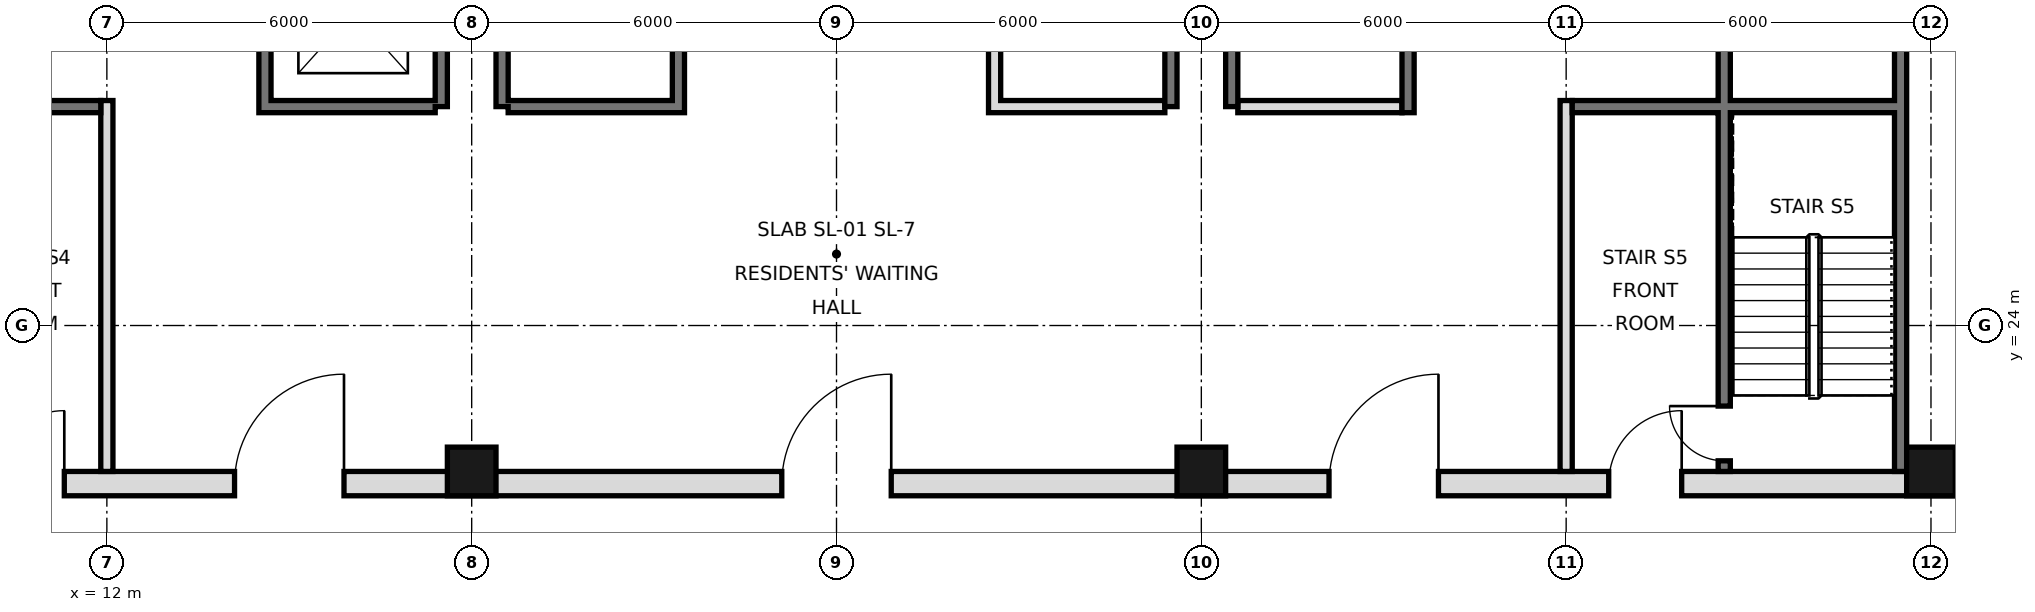
"""IFC4 building model, lengths in metres.
Left out: names, types, materials, properties, quantities, classifications, styles, units other than length and angle.
Written with IfcOpenShell. Run it as: python <this file> out.ifc"""

import sys

from ifc_helpers import new_model, si_unit, direction, frame, frame_2d, origin, origin_2d, place, context, subcontext, project, spatial, rectangle, hollow_rectangle, extrude, element, fill, save


model = new_model("IFC4")
c1 = context("Model", 3, precision=1e-05, world=origin(), true_north=direction((0.0, 1.0)))
c2 = subcontext(c1, "Body", "Model", "MODEL_VIEW")
j1 = project(units=[si_unit("LENGTHUNIT", "METRE"), si_unit("PLANEANGLEUNIT", "RADIAN")], contexts=[c1])
p1 = place(None, origin())
s1 = spatial("IfcSite", under=j1, at=p1, CompositionType="ELEMENT")
p2 = place(p1, origin())
s2 = spatial("IfcBuilding", under=s1, at=p2, CompositionType="ELEMENT")
p3 = place(p2, frame((0.0, 0.0, 78.6)))
s3 = spatial("IfcBuildingStorey", under=s2, at=p3, CompositionType="ELEMENT", Elevation=78.6)
for number, where, z_axis, x_axis in (
    (1, (18.0, 21.6, 0.0), (0.0, 0.0, 1.0), (1.0, 0.0, 0.0)),
    (2, (30.0, 21.6, 0.0), (0.0, 0.0, 1.0), (1.0, 0.0, 0.0)),
    (3, (42.0, 21.6, 0.0), (0.0, 0.0, 1.0), (1.0, 0.0, 0.0)),
):
    element("IfcColumn", number, at=place(p3, frame(where, z_axis=z_axis, x_axis=x_axis)), inside=s3, PredefinedType="COLUMN", context=c2, shape_type="SweptSolid", body=[
        extrude(hollow_rectangle(XDim=0.8, YDim=0.8, WallThickness=0.06, at=origin_2d()), origin(), (0.0, 0.0, 1.0), 3.6),
    ])
p4 = place(p3, frame((41.5, 21.6, 0.0), z_axis=(0.0, 0.0, 1.0), x_axis=(0.0, 1.0, 0.0)))
e4 = element("IfcWall", 4, at=p4, inside=s3, PredefinedType="SOLIDWALL", context=c2, shape_type="SweptSolid", body=[
    extrude(rectangle(XDim=23.5, YDim=0.2, at=frame_2d((11.75, 0.0))), origin(), (0.0, 0.0, 1.0), 3.42),
])
for number, where, z_axis, x_axis in (
    (5, (17.5, 27.6, 0.0), (0.0, 0.0, 1.0), (0.0, 1.0, 0.0)),
    (6, (18.5, 27.6, 0.0), (0.0, 0.0, 1.0), (0.0, 1.0, 0.0)),
    (7, (29.5, 27.6, 0.0), (0.0, 0.0, 1.0), (0.0, 1.0, 0.0)),
    (8, (30.5, 27.6, 0.0), (0.0, 0.0, 1.0), (0.0, 1.0, 0.0)),
):
    element("IfcWall", number, at=place(p3, frame(where, z_axis=z_axis, x_axis=x_axis)), inside=s3, PredefinedType="SOLIDWALL", context=c2, shape_type="SweptSolid", body=[
        extrude(rectangle(XDim=17.5, YDim=0.2, at=frame_2d((8.75, 0.0))), origin(), (0.0, 0.0, 1.0), 3.42),
    ])
p5 = place(p3, frame((5.6, 21.4, 0.0), z_axis=(0.0, 0.0, 1.0), x_axis=(1.0, 0.0, 0.0)))
e9 = element("IfcWall", 9, at=p5, inside=s3, PredefinedType="SOLIDWALL", context=c2, shape_type="SweptSolid", body=[
    extrude(rectangle(XDim=36.8, YDim=0.4, at=frame_2d((18.4, 0.0))), origin(), (0.0, 0.0, 1.0), 3.42),
])
p6 = place(p5, frame((8.5, 0.0, 0.0)))
e10 = element("IfcOpeningElement", 10, at=p6, cuts=e9, PredefinedType="OPENING", context=c2, shape_type="SweptSolid", body=[
    extrude(rectangle(XDim=1.8, YDim=2.1, at=frame_2d((0.9, 1.05))), frame((0.0, 0.21, 0.0), z_axis=(0.0, -1.0, 0.0), x_axis=(1.0, 0.0, 0.0)), (0.0, 0.0, 1.0), 0.42),
])
p7 = place(p5, frame((17.5, 0.0, 0.0)))
e11 = element("IfcOpeningElement", 11, at=p7, cuts=e9, PredefinedType="OPENING", context=c2, shape_type="SweptSolid", body=[
    extrude(rectangle(XDim=1.8, YDim=2.1, at=frame_2d((0.9, 1.05))), frame((0.0, 0.21, 0.0), z_axis=(0.0, -1.0, 0.0), x_axis=(1.0, 0.0, 0.0)), (0.0, 0.0, 1.0), 0.42),
])
p8 = place(p5, frame((26.5, 0.0, 0.0)))
e12 = element("IfcOpeningElement", 12, at=p8, cuts=e9, PredefinedType="OPENING", context=c2, shape_type="SweptSolid", body=[
    extrude(rectangle(XDim=1.8, YDim=2.1, at=frame_2d((0.9, 1.05))), frame((0.0, 0.21, 0.0), z_axis=(0.0, -1.0, 0.0), x_axis=(1.0, 0.0, 0.0)), (0.0, 0.0, 1.0), 0.42),
])
p9 = place(p5, frame((4.5, 0.0, 0.0)))
e13 = element("IfcOpeningElement", 13, at=p9, cuts=e9, PredefinedType="OPENING", context=c2, shape_type="SweptSolid", body=[
    extrude(rectangle(XDim=1.2, YDim=2.1, at=frame_2d((0.6, 1.05))), frame((0.0, 0.21, 0.0), z_axis=(0.0, -1.0, 0.0), x_axis=(1.0, 0.0, 0.0)), (0.0, 0.0, 1.0), 0.42),
])
p10 = place(p5, frame((31.1, 0.0, 0.0)))
e14 = element("IfcOpeningElement", 14, at=p10, cuts=e9, PredefinedType="OPENING", context=c2, shape_type="SweptSolid", body=[
    extrude(rectangle(XDim=1.2, YDim=2.1, at=frame_2d((0.6, 1.05))), frame((0.0, 0.21, 0.0), z_axis=(0.0, -1.0, 0.0), x_axis=(1.0, 0.0, 0.0)), (0.0, 0.0, 1.0), 0.42),
])
p11 = place(p3, frame((12.0, 21.6, 0.0), z_axis=(0.0, 0.0, 1.0), x_axis=(0.0, 1.0, 0.0)))
e15 = element("IfcWall", 15, at=p11, inside=s3, PredefinedType="PARTITIONING", context=c2, shape_type="SweptSolid", body=[
    extrude(rectangle(XDim=6.1, YDim=0.2, at=frame_2d((3.05, 0.0))), origin(), (0.0, 0.0, 1.0), 3.42),
])
p12 = place(p3, frame((14.6, 27.5, 0.0), z_axis=(0.0, 0.0, 1.0), x_axis=(0.0, 1.0, 0.0)))
e16 = element("IfcWall", 16, at=p12, inside=s3, PredefinedType="SOLIDWALL", context=c2, shape_type="SweptSolid", body=[
    extrude(rectangle(XDim=17.5, YDim=0.2, at=frame_2d((8.75, 0.0))), origin(), (0.0, 0.0, 1.0), 3.42),
])
p13 = place(p12, frame((1.1, 0.0, 0.0)))
e17 = element("IfcOpeningElement", 17, at=p13, cuts=e16, PredefinedType="OPENING", context=c2, shape_type="SweptSolid", body=[
    extrude(rectangle(XDim=1.1, YDim=2.1, at=frame_2d((0.55, 1.05))), frame((0.0, 0.11, 0.0), z_axis=(0.0, -1.0, 0.0), x_axis=(1.0, 0.0, 0.0)), (0.0, 0.0, 1.0), 0.22),
])
p14 = place(p12, frame((4.2, 0.0, 0.0)))
e18 = element("IfcOpeningElement", 18, at=p14, cuts=e16, PredefinedType="OPENING", context=c2, shape_type="SweptSolid", body=[
    extrude(rectangle(XDim=1.1, YDim=2.1, at=frame_2d((0.55, 1.05))), frame((0.0, 0.11, 0.0), z_axis=(0.0, -1.0, 0.0), x_axis=(1.0, 0.0, 0.0)), (0.0, 0.0, 1.0), 0.22),
])
p15 = place(p12, frame((15.4, 0.0, 0.0)))
e19 = element("IfcOpeningElement", 19, at=p15, cuts=e16, PredefinedType="OPENING", context=c2, shape_type="SweptSolid", body=[
    extrude(rectangle(XDim=1.1, YDim=2.1, at=frame_2d((0.55, 1.05))), frame((0.0, 0.11, 0.0), z_axis=(0.0, -1.0, 0.0), x_axis=(1.0, 0.0, 0.0)), (0.0, 0.0, 1.0), 0.22),
])
p16 = place(p12, frame((9.9, 0.0, 0.0)))
e20 = element("IfcOpeningElement", 20, at=p16, cuts=e16, PredefinedType="OPENING", context=c2, shape_type="SweptSolid", body=[
    extrude(rectangle(XDim=0.9, YDim=2.1, at=frame_2d((0.45, 1.05))), frame((0.0, 0.11, 0.0), z_axis=(0.0, -1.0, 0.0), x_axis=(1.0, 0.0, 0.0)), (0.0, 0.0, 1.0), 0.22),
])
p17 = place(p3, frame((21.4, 27.5, 0.0), z_axis=(0.0, 0.0, 1.0), x_axis=(0.0, 1.0, 0.0)))
e21 = element("IfcWall", 21, at=p17, inside=s3, PredefinedType="SOLIDWALL", context=c2, shape_type="SweptSolid", body=[
    extrude(rectangle(XDim=17.5, YDim=0.2, at=frame_2d((8.75, 0.0))), origin(), (0.0, 0.0, 1.0), 3.42),
])
p18 = place(p17, frame((9.8, 0.0, 0.0)))
e22 = element("IfcOpeningElement", 22, at=p18, cuts=e21, PredefinedType="OPENING", context=c2, shape_type="SweptSolid", body=[
    extrude(rectangle(XDim=1.0, YDim=2.1, at=frame_2d((0.5, 1.05))), frame((0.0, 0.11, 0.0), z_axis=(0.0, -1.0, 0.0), x_axis=(1.0, 0.0, 0.0)), (0.0, 0.0, 1.0), 0.22),
])
p19 = place(p17, frame((7.4, 0.0, 0.0)))
e23 = element("IfcOpeningElement", 23, at=p19, cuts=e21, PredefinedType="OPENING", context=c2, shape_type="SweptSolid", body=[
    extrude(rectangle(XDim=0.9, YDim=2.1, at=frame_2d((0.45, 1.05))), frame((0.0, 0.11, 0.0), z_axis=(0.0, -1.0, 0.0), x_axis=(1.0, 0.0, 0.0)), (0.0, 0.0, 1.0), 0.22),
])
p20 = place(p3, frame((26.6, 27.5, 0.0), z_axis=(0.0, 0.0, 1.0), x_axis=(0.0, 1.0, 0.0)))
e24 = element("IfcWall", 24, at=p20, inside=s3, PredefinedType="SOLIDWALL", context=c2, shape_type="SweptSolid", body=[
    extrude(rectangle(XDim=17.5, YDim=0.2, at=frame_2d((8.75, 0.0))), origin(), (0.0, 0.0, 1.0), 3.42),
])
p21 = place(p20, frame((4.3, 0.0, 0.0)))
e25 = element("IfcOpeningElement", 25, at=p21, cuts=e24, PredefinedType="OPENING", context=c2, shape_type="SweptSolid", body=[
    extrude(rectangle(XDim=0.9, YDim=2.1, at=frame_2d((0.45, 1.05))), frame((0.0, 0.11, 0.0), z_axis=(0.0, -1.0, 0.0), x_axis=(1.0, 0.0, 0.0)), (0.0, 0.0, 1.0), 0.22),
])
p22 = place(p20, frame((10.35, 0.0, 0.0)))
e26 = element("IfcOpeningElement", 26, at=p22, cuts=e24, PredefinedType="OPENING", context=c2, shape_type="SweptSolid", body=[
    extrude(rectangle(XDim=1.0, YDim=2.1, at=frame_2d((0.5, 1.05))), frame((0.0, 0.11, 0.0), z_axis=(0.0, -1.0, 0.0), x_axis=(1.0, 0.0, 0.0)), (0.0, 0.0, 1.0), 0.22),
])
p23 = place(p20, frame((14.575, 0.0, 0.0)))
e27 = element("IfcOpeningElement", 27, at=p23, cuts=e24, PredefinedType="OPENING", context=c2, shape_type="SweptSolid", body=[
    extrude(rectangle(XDim=1.0, YDim=2.1, at=frame_2d((0.5, 1.05))), frame((0.0, 0.11, 0.0), z_axis=(0.0, -1.0, 0.0), x_axis=(1.0, 0.0, 0.0)), (0.0, 0.0, 1.0), 0.22),
])
p24 = place(p3, frame((33.4, 27.5, 0.0), z_axis=(0.0, 0.0, 1.0), x_axis=(0.0, 1.0, 0.0)))
e28 = element("IfcWall", 28, at=p24, inside=s3, PredefinedType="SOLIDWALL", context=c2, shape_type="SweptSolid", body=[
    extrude(rectangle(XDim=17.5, YDim=0.2, at=frame_2d((8.75, 0.0))), origin(), (0.0, 0.0, 1.0), 3.42),
])
p25 = place(p24, frame((15.4, 0.0, 0.0)))
e29 = element("IfcOpeningElement", 29, at=p25, cuts=e28, PredefinedType="OPENING", context=c2, shape_type="SweptSolid", body=[
    extrude(rectangle(XDim=1.1, YDim=2.1, at=frame_2d((0.55, 1.05))), frame((0.0, 0.11, 0.0), z_axis=(0.0, -1.0, 0.0), x_axis=(1.0, 0.0, 0.0)), (0.0, 0.0, 1.0), 0.22),
])
p26 = place(p24, frame((2.7, 0.0, 0.0)))
e30 = element("IfcOpeningElement", 30, at=p26, cuts=e28, PredefinedType="OPENING", context=c2, shape_type="SweptSolid", body=[
    extrude(rectangle(XDim=1.0, YDim=2.1, at=frame_2d((0.5, 1.05))), frame((0.0, 0.11, 0.0), z_axis=(0.0, -1.0, 0.0), x_axis=(1.0, 0.0, 0.0)), (0.0, 0.0, 1.0), 0.22),
])
p27 = place(p24, frame((9.9, 0.0, 0.0)))
e31 = element("IfcOpeningElement", 31, at=p27, cuts=e28, PredefinedType="OPENING", context=c2, shape_type="SweptSolid", body=[
    extrude(rectangle(XDim=0.9, YDim=2.1, at=frame_2d((0.45, 1.05))), frame((0.0, 0.11, 0.0), z_axis=(0.0, -1.0, 0.0), x_axis=(1.0, 0.0, 0.0)), (0.0, 0.0, 1.0), 0.22),
])
p28 = place(p3, frame((36.0, 21.6, 0.0), z_axis=(0.0, 0.0, 1.0), x_axis=(0.0, 1.0, 0.0)))
e32 = element("IfcWall", 32, at=p28, inside=s3, PredefinedType="PARTITIONING", context=c2, shape_type="SweptSolid", body=[
    extrude(rectangle(XDim=6.1, YDim=0.2, at=frame_2d((3.05, 0.0))), origin(), (0.0, 0.0, 1.0), 3.42),
])
p29 = place(p3, frame((38.6, 21.6, 0.0), z_axis=(0.0, 0.0, 1.0), x_axis=(0.0, 1.0, 0.0)))
e33 = element("IfcWall", 33, at=p29, inside=s3, PredefinedType="SOLIDWALL", context=c2, shape_type="SweptSolid", body=[
    extrude(rectangle(XDim=23.4, YDim=0.2, at=frame_2d((11.7, 0.0))), origin(), (0.0, 0.0, 1.0), 3.42),
])
p30 = place(p29, frame((8.6, 0.0, 0.0)))
e34 = element("IfcOpeningElement", 34, at=p30, cuts=e33, PredefinedType="OPENING", context=c2, shape_type="SweptSolid", body=[
    extrude(rectangle(XDim=1.0, YDim=2.1, at=frame_2d((0.5, 1.05))), frame((0.0, 0.11, 0.0), z_axis=(0.0, -1.0, 0.0), x_axis=(1.0, 0.0, 0.0)), (0.0, 0.0, 1.0), 0.22),
])
p31 = place(p29, frame((13.25, 0.0, 0.0)))
e35 = element("IfcOpeningElement", 35, at=p31, cuts=e33, PredefinedType="OPENING", context=c2, shape_type="SweptSolid", body=[
    extrude(rectangle(XDim=1.0, YDim=2.1, at=frame_2d((0.5, 1.05))), frame((0.0, 0.11, 0.0), z_axis=(0.0, -1.0, 0.0), x_axis=(1.0, 0.0, 0.0)), (0.0, 0.0, 1.0), 0.22),
])
p32 = place(p29, frame((15.7, 0.0, 0.0)))
e36 = element("IfcOpeningElement", 36, at=p32, cuts=e33, PredefinedType="OPENING", context=c2, shape_type="SweptSolid", body=[
    extrude(rectangle(XDim=1.0, YDim=2.1, at=frame_2d((0.5, 1.05))), frame((0.0, 0.11, 0.0), z_axis=(0.0, -1.0, 0.0), x_axis=(1.0, 0.0, 0.0)), (0.0, 0.0, 1.0), 0.22),
])
p33 = place(p29, frame((0.175, 0.0, 0.0)))
e37 = element("IfcOpeningElement", 37, at=p33, cuts=e33, PredefinedType="OPENING", context=c2, shape_type="SweptSolid", body=[
    extrude(rectangle(XDim=0.9, YDim=2.1, at=frame_2d((0.45, 1.05))), frame((0.0, 0.11, 0.0), z_axis=(0.0, -1.0, 0.0), x_axis=(1.0, 0.0, 0.0)), (0.0, 0.0, 1.0), 0.22),
])
for number, where, z_axis, x_axis in (
    (38, (14.7, 27.6, 0.0), (0.0, 0.0, 1.0), (1.0, 0.0, 0.0)),
    (39, (18.6, 27.6, 0.0), (0.0, 0.0, 1.0), (1.0, 0.0, 0.0)),
    (40, (26.7, 27.6, 0.0), (0.0, 0.0, 1.0), (1.0, 0.0, 0.0)),
):
    element("IfcWall", number, at=place(p3, frame(where, z_axis=z_axis, x_axis=x_axis)), inside=s3, PredefinedType="SOLIDWALL", context=c2, shape_type="SweptSolid", body=[
        extrude(rectangle(XDim=2.7, YDim=0.2, at=frame_2d((1.35, 0.0))), origin(), (0.0, 0.0, 1.0), 3.42),
    ])
p34 = place(p3, frame((30.6, 27.6, 0.0), z_axis=(0.0, 0.0, 1.0), x_axis=(1.0, 0.0, 0.0)))
e41 = element("IfcWall", 41, at=p34, inside=s3, PredefinedType="PARTITIONING", context=c2, shape_type="SweptSolid", body=[
    extrude(rectangle(XDim=2.7, YDim=0.2, at=frame_2d((1.35, 0.0))), origin(), (0.0, 0.0, 1.0), 3.42),
])
for number, where, z_axis, x_axis in (
    (42, (36.1, 27.6, 0.0), (0.0, 0.0, 1.0), (1.0, 0.0, 0.0)),
    (43, (6.6, 27.6, 0.0), (0.0, 0.0, 1.0), (1.0, 0.0, 0.0)),
):
    element("IfcWall", number, at=place(p3, frame(where, z_axis=z_axis, x_axis=x_axis)), inside=s3, PredefinedType="SOLIDWALL", context=c2, shape_type="SweptSolid", body=[
        extrude(rectangle(XDim=5.3, YDim=0.2, at=frame_2d((2.65, 0.0))), origin(), (0.0, 0.0, 1.0), 3.42),
    ])
p35 = place(p6, frame((1.8, 0.0, 0.0), z_axis=(0.0, 0.0, 1.0), x_axis=(-1.0, 0.0, 0.0)))
e44 = element("IfcDoor", 44, at=p35, inside=s3, OperationType="SINGLE_SWING_LEFT", PredefinedType="DOOR", context=c2, shape_type="SweptSolid", body=[
    extrude(rectangle(XDim=1.8, YDim=2.1, at=frame_2d((0.9, 1.05))), frame((0.0, 0.025, 0.0), z_axis=(0.0, -1.0, 0.0), x_axis=(1.0, 0.0, 0.0)), (0.0, 0.0, 1.0), 0.05),
])
fill(e10, e44)
p36 = place(p7, frame((1.8, 0.0, 0.0), z_axis=(0.0, 0.0, 1.0), x_axis=(-1.0, 0.0, 0.0)))
e45 = element("IfcDoor", 45, at=p36, inside=s3, OperationType="SINGLE_SWING_LEFT", PredefinedType="DOOR", context=c2, shape_type="SweptSolid", body=[
    extrude(rectangle(XDim=1.8, YDim=2.1, at=frame_2d((0.9, 1.05))), frame((0.0, 0.025, 0.0), z_axis=(0.0, -1.0, 0.0), x_axis=(1.0, 0.0, 0.0)), (0.0, 0.0, 1.0), 0.05),
])
fill(e11, e45)
p37 = place(p8, frame((1.8, 0.0, 0.0), z_axis=(0.0, 0.0, 1.0), x_axis=(-1.0, 0.0, 0.0)))
e46 = element("IfcDoor", 46, at=p37, inside=s3, OperationType="SINGLE_SWING_LEFT", PredefinedType="DOOR", context=c2, shape_type="SweptSolid", body=[
    extrude(rectangle(XDim=1.8, YDim=2.1, at=frame_2d((0.9, 1.05))), frame((0.0, 0.025, 0.0), z_axis=(0.0, -1.0, 0.0), x_axis=(1.0, 0.0, 0.0)), (0.0, 0.0, 1.0), 0.05),
])
fill(e12, e46)
p38 = place(p9, frame((1.2, 0.0, 0.0), z_axis=(0.0, 0.0, 1.0), x_axis=(-1.0, 0.0, 0.0)))
e47 = element("IfcDoor", 47, at=p38, inside=s3, OperationType="SINGLE_SWING_LEFT", PredefinedType="DOOR", context=c2, shape_type="SweptSolid", body=[
    extrude(rectangle(XDim=1.2, YDim=2.1, at=frame_2d((0.6, 1.05))), frame((0.0, 0.025, 0.0), z_axis=(0.0, -1.0, 0.0), x_axis=(1.0, 0.0, 0.0)), (0.0, 0.0, 1.0), 0.05),
])
fill(e13, e47)
p39 = place(p10, frame((1.2, 0.0, 0.0), z_axis=(0.0, 0.0, 1.0), x_axis=(-1.0, 0.0, 0.0)))
e48 = element("IfcDoor", 48, at=p39, inside=s3, OperationType="SINGLE_SWING_LEFT", PredefinedType="DOOR", context=c2, shape_type="SweptSolid", body=[
    extrude(rectangle(XDim=1.2, YDim=2.1, at=frame_2d((0.6, 1.05))), frame((0.0, 0.025, 0.0), z_axis=(0.0, -1.0, 0.0), x_axis=(1.0, 0.0, 0.0)), (0.0, 0.0, 1.0), 0.05),
])
fill(e14, e48)
p40 = place(p33, frame((0.9, 0.0, 0.0), z_axis=(0.0, 0.0, 1.0), x_axis=(-1.0, 0.0, 0.0)))
e49 = element("IfcDoor", 49, at=p40, inside=s3, OperationType="SINGLE_SWING_LEFT", PredefinedType="DOOR", context=c2, shape_type="SweptSolid", body=[
    extrude(rectangle(XDim=0.9, YDim=2.1, at=frame_2d((0.45, 1.05))), frame((0.0, 0.025, 0.0), z_axis=(0.0, -1.0, 0.0), x_axis=(1.0, 0.0, 0.0)), (0.0, 0.0, 1.0), 0.05),
])
fill(e37, e49)
save(model, sys.argv[1])
